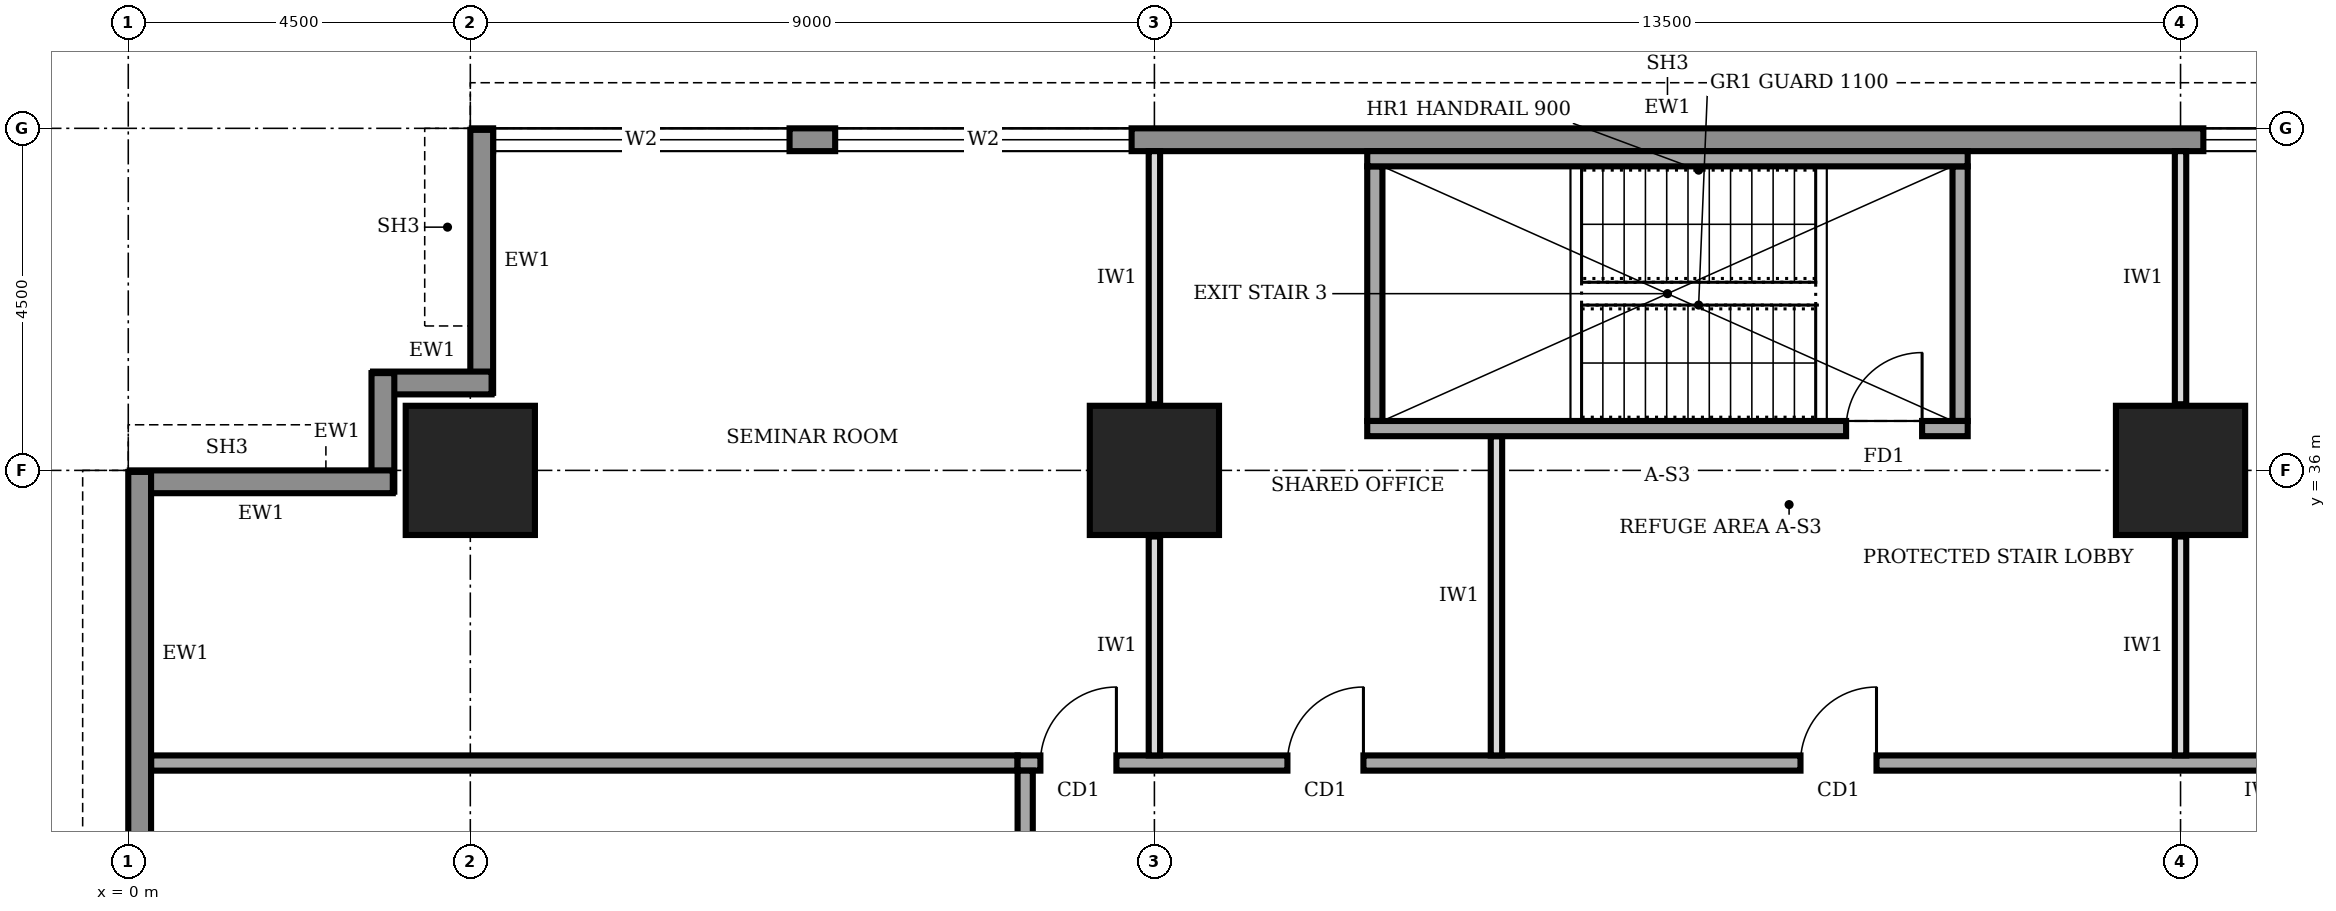
"""IFC4 building model, lengths in metres.
Left out: names, types, materials, properties, quantities, classifications, styles, units other than length and angle.
Written with IfcOpenShell. Run it as: python <this file> out.ifc"""

import sys

from ifc_helpers import new_model, si_unit, direction, frame, frame_2d, origin, origin_2d, place, context, subcontext, project, spatial, rectangle, extrude, element, fill, save


model = new_model("IFC4")
c1 = context("Model", 3, precision=1e-05, world=origin(), true_north=direction((0.0, 1.0)))
c2 = subcontext(c1, "Body", "Model", "MODEL_VIEW")
j1 = project(units=[si_unit("LENGTHUNIT", "METRE"), si_unit("PLANEANGLEUNIT", "RADIAN")], contexts=[c1])
p1 = place(None, origin())
s1 = spatial("IfcSite", under=j1, at=p1, CompositionType="ELEMENT")
p2 = place(p1, origin())
s2 = spatial("IfcBuilding", under=s1, at=p2, CompositionType="ELEMENT")
p3 = place(p2, frame((0.0, 0.0, 165.0)))
s3 = spatial("IfcBuildingStorey", under=s2, at=p3, CompositionType="ELEMENT", Elevation=165.0)
for number, where, z_axis, x_axis in (
    (1, (4.5, 36.0, 0.0), (0.0, 0.0, 1.0), (1.0, 0.0, 0.0)),
    (2, (13.5, 36.0, 0.0), (0.0, 0.0, 1.0), (1.0, 0.0, 0.0)),
    (3, (27.0, 36.0, 0.0), (0.0, 0.0, 1.0), (1.0, 0.0, 0.0)),
):
    element("IfcColumn", number, at=place(p3, frame(where, z_axis=z_axis, x_axis=x_axis)), inside=s3, PredefinedType="COLUMN", context=c2, shape_type="SweptSolid", body=[
        extrude(rectangle(XDim=1.7, YDim=1.7, at=origin_2d()), origin(), (0.0, 0.0, 1.0), 4.0),
    ])
p4 = place(p3, frame((35.98, 40.35, 0.0), z_axis=(0.0, 0.0, 1.0), x_axis=(-1.0, 0.0, 0.0)))
e4 = element("IfcWall", 4, at=p4, inside=s3, PredefinedType="STANDARD", context=c2, shape_type="SweptSolid", body=[
    extrude(rectangle(XDim=31.46, YDim=0.3, at=frame_2d((15.73, 0.0))), origin(), (0.0, 0.0, 1.0), 3.75),
])
p5 = place(p4, frame((27.28, 0.0, 0.6)))
e5 = element("IfcOpeningElement", 5, at=p5, cuts=e4, PredefinedType="OPENING", context=c2, shape_type="SweptSolid", body=[
    extrude(rectangle(XDim=3.9, YDim=2.6, at=frame_2d((1.95, 1.3))), frame((0.0, 0.16, 0.0), z_axis=(0.0, -1.0, 0.0), x_axis=(1.0, 0.0, 0.0)), (0.0, 0.0, 1.0), 0.32),
])
p6 = place(p4, frame((22.78, 0.0, 0.6)))
e6 = element("IfcOpeningElement", 6, at=p6, cuts=e4, PredefinedType="OPENING", context=c2, shape_type="SweptSolid", body=[
    extrude(rectangle(XDim=3.9, YDim=2.6, at=frame_2d((1.95, 1.3))), frame((0.0, 0.16, 0.0), z_axis=(0.0, -1.0, 0.0), x_axis=(1.0, 0.0, 0.0)), (0.0, 0.0, 1.0), 0.32),
])
p7 = place(p4, frame((4.78, 0.0, 0.6)))
e7 = element("IfcOpeningElement", 7, at=p7, cuts=e4, PredefinedType="OPENING", context=c2, shape_type="SweptSolid", body=[
    extrude(rectangle(XDim=3.9, YDim=2.6, at=frame_2d((1.95, 1.3))), frame((0.0, 0.16, 0.0), z_axis=(0.0, -1.0, 0.0), x_axis=(1.0, 0.0, 0.0)), (0.0, 0.0, 1.0), 0.32),
])
p8 = place(p3, frame((4.65, 40.48, 0.0), z_axis=(0.0, 0.0, 1.0), x_axis=(0.0, -1.0, 0.0)))
e8 = element("IfcWall", 8, at=p8, inside=s3, PredefinedType="STANDARD", context=c2, shape_type="SweptSolid", body=[
    extrude(rectangle(XDim=3.46, YDim=0.3, at=frame_2d((1.73, 0.0))), origin(), (0.0, 0.0, 1.0), 2.75),
])
for number, where, z_axis, x_axis in (
    (9, (4.78, 37.15, 0.0), (0.0, 0.0, 1.0), (-1.0, 0.0, 0.0)),
    (10, (3.35, 37.28, 0.0), (0.0, 0.0, 1.0), (0.0, -1.0, 0.0)),
):
    element("IfcWall", number, at=place(p3, frame(where, z_axis=z_axis, x_axis=x_axis)), inside=s3, PredefinedType="STANDARD", context=c2, shape_type="SweptSolid", body=[
        extrude(rectangle(XDim=1.56, YDim=0.3, at=frame_2d((0.78, 0.0))), origin(), (0.0, 0.0, 1.0), 3.75),
    ])
p9 = place(p3, frame((3.48, 35.85, 0.0), z_axis=(0.0, 0.0, 1.0), x_axis=(-1.0, 0.0, 0.0)))
e11 = element("IfcWall", 11, at=p9, inside=s3, PredefinedType="STANDARD", context=c2, shape_type="SweptSolid", body=[
    extrude(rectangle(XDim=3.46, YDim=0.3, at=frame_2d((1.73, 0.0))), origin(), (0.0, 0.0, 1.0), 2.75),
])
p10 = place(p3, frame((0.15, 35.98, 0.0), z_axis=(0.0, 0.0, 1.0), x_axis=(0.0, -1.0, 0.0)))
e12 = element("IfcWall", 12, at=p10, inside=s3, PredefinedType="STANDARD", context=c2, shape_type="SweptSolid", body=[
    extrude(rectangle(XDim=31.46, YDim=0.3, at=frame_2d((15.73, 0.0))), origin(), (0.0, 0.0, 1.0), 3.75),
])
p11 = place(p10, frame((27.28, 0.0, 0.6)))
e13 = element("IfcOpeningElement", 13, at=p11, cuts=e12, PredefinedType="OPENING", context=c2, shape_type="SweptSolid", body=[
    extrude(rectangle(XDim=3.9, YDim=2.6, at=frame_2d((1.95, 1.3))), frame((0.0, 0.16, 0.0), z_axis=(0.0, -1.0, 0.0), x_axis=(1.0, 0.0, 0.0)), (0.0, 0.0, 1.0), 0.32),
])
p12 = place(p10, frame((22.78, 0.0, 0.6)))
e14 = element("IfcOpeningElement", 14, at=p12, cuts=e12, PredefinedType="OPENING", context=c2, shape_type="SweptSolid", body=[
    extrude(rectangle(XDim=3.9, YDim=2.6, at=frame_2d((1.95, 1.3))), frame((0.0, 0.16, 0.0), z_axis=(0.0, -1.0, 0.0), x_axis=(1.0, 0.0, 0.0)), (0.0, 0.0, 1.0), 0.32),
])
p13 = place(p10, frame((18.28, 0.0, 0.6)))
e15 = element("IfcOpeningElement", 15, at=p13, cuts=e12, PredefinedType="OPENING", context=c2, shape_type="SweptSolid", body=[
    extrude(rectangle(XDim=3.9, YDim=2.6, at=frame_2d((1.95, 1.3))), frame((0.0, 0.16, 0.0), z_axis=(0.0, -1.0, 0.0), x_axis=(1.0, 0.0, 0.0)), (0.0, 0.0, 1.0), 0.32),
])
p14 = place(p10, frame((13.78, 0.0, 0.6)))
e16 = element("IfcOpeningElement", 16, at=p14, cuts=e12, PredefinedType="OPENING", context=c2, shape_type="SweptSolid", body=[
    extrude(rectangle(XDim=3.9, YDim=2.6, at=frame_2d((1.95, 1.3))), frame((0.0, 0.16, 0.0), z_axis=(0.0, -1.0, 0.0), x_axis=(1.0, 0.0, 0.0)), (0.0, 0.0, 1.0), 0.32),
])
p15 = place(p10, frame((9.28, 0.0, 0.6)))
e17 = element("IfcOpeningElement", 17, at=p15, cuts=e12, PredefinedType="OPENING", context=c2, shape_type="SweptSolid", body=[
    extrude(rectangle(XDim=3.9, YDim=2.6, at=frame_2d((1.95, 1.3))), frame((0.0, 0.16, 0.0), z_axis=(0.0, -1.0, 0.0), x_axis=(1.0, 0.0, 0.0)), (0.0, 0.0, 1.0), 0.32),
])
p16 = place(p10, frame((4.78, 0.0, 0.6)))
e18 = element("IfcOpeningElement", 18, at=p16, cuts=e12, PredefinedType="OPENING", context=c2, shape_type="SweptSolid", body=[
    extrude(rectangle(XDim=3.9, YDim=2.6, at=frame_2d((1.95, 1.3))), frame((0.0, 0.16, 0.0), z_axis=(0.0, -1.0, 0.0), x_axis=(1.0, 0.0, 0.0)), (0.0, 0.0, 1.0), 0.32),
])
p17 = place(p3, frame((40.2, 32.15, 0.0), z_axis=(0.0, 0.0, 1.0), x_axis=(-1.0, 0.0, 0.0)))
e19 = element("IfcWall", 19, at=p17, inside=s3, PredefinedType="SOLIDWALL", context=c2, shape_type="SweptSolid", body=[
    extrude(rectangle(XDim=28.5, YDim=0.2, at=frame_2d((14.25, 0.0))), origin(), (0.0, 0.0, 1.0), 3.75),
])
p18 = place(p17, frame((27.2, 0.0, 0.0)))
e20 = element("IfcOpeningElement", 20, at=p18, cuts=e19, PredefinedType="OPENING", context=c2, shape_type="SweptSolid", body=[
    extrude(rectangle(XDim=1.0, YDim=2.1, at=frame_2d((0.5, 1.05))), frame((0.0, 0.11, 0.0), z_axis=(0.0, -1.0, 0.0), x_axis=(1.0, 0.0, 0.0)), (0.0, 0.0, 1.0), 0.22),
])
p19 = place(p17, frame((23.95, 0.0, 0.0)))
e21 = element("IfcOpeningElement", 21, at=p19, cuts=e19, PredefinedType="OPENING", context=c2, shape_type="SweptSolid", body=[
    extrude(rectangle(XDim=1.0, YDim=2.1, at=frame_2d((0.5, 1.05))), frame((0.0, 0.11, 0.0), z_axis=(0.0, -1.0, 0.0), x_axis=(1.0, 0.0, 0.0)), (0.0, 0.0, 1.0), 0.22),
])
p20 = place(p17, frame((17.2, 0.0, 0.0)))
e22 = element("IfcOpeningElement", 22, at=p20, cuts=e19, PredefinedType="OPENING", context=c2, shape_type="SweptSolid", body=[
    extrude(rectangle(XDim=1.0, YDim=2.1, at=frame_2d((0.5, 1.05))), frame((0.0, 0.11, 0.0), z_axis=(0.0, -1.0, 0.0), x_axis=(1.0, 0.0, 0.0)), (0.0, 0.0, 1.0), 0.22),
])
p21 = place(p17, frame((6.0, 0.0, 0.0)))
e23 = element("IfcOpeningElement", 23, at=p21, cuts=e19, PredefinedType="OPENING", context=c2, shape_type="SweptSolid", body=[
    extrude(rectangle(XDim=1.0, YDim=2.1, at=frame_2d((0.5, 1.05))), frame((0.0, 0.11, 0.0), z_axis=(0.0, -1.0, 0.0), x_axis=(1.0, 0.0, 0.0)), (0.0, 0.0, 1.0), 0.22),
])
p22 = place(p3, frame((11.8, 32.05, 0.0), z_axis=(0.0, 0.0, 1.0), x_axis=(0.0, -1.0, 0.0)))
e24 = element("IfcWall", 24, at=p22, inside=s3, PredefinedType="SOLIDWALL", context=c2, shape_type="SweptSolid", body=[
    extrude(rectangle(XDim=23.8, YDim=0.2, at=frame_2d((11.9, 0.0))), origin(), (0.0, 0.0, 1.0), 3.75),
])
p23 = place(p22, frame((20.675, 0.0, 0.0)))
e25 = element("IfcOpeningElement", 25, at=p23, cuts=e24, PredefinedType="OPENING", context=c2, shape_type="SweptSolid", body=[
    extrude(rectangle(XDim=1.0, YDim=2.1, at=frame_2d((0.5, 1.05))), frame((0.0, 0.11, 0.0), z_axis=(0.0, -1.0, 0.0), x_axis=(1.0, 0.0, 0.0)), (0.0, 0.0, 1.0), 0.22),
])
p24 = place(p22, frame((16.2, 0.0, 0.0)))
e26 = element("IfcOpeningElement", 26, at=p24, cuts=e24, PredefinedType="OPENING", context=c2, shape_type="SweptSolid", body=[
    extrude(rectangle(XDim=0.9, YDim=2.1, at=frame_2d((0.45, 1.05))), frame((0.0, 0.11, 0.0), z_axis=(0.0, -1.0, 0.0), x_axis=(1.0, 0.0, 0.0)), (0.0, 0.0, 1.0), 0.22),
])
p25 = place(p22, frame((13.2, 0.0, 0.0)))
e27 = element("IfcOpeningElement", 27, at=p25, cuts=e24, PredefinedType="OPENING", context=c2, shape_type="SweptSolid", body=[
    extrude(rectangle(XDim=0.9, YDim=2.1, at=frame_2d((0.45, 1.05))), frame((0.0, 0.11, 0.0), z_axis=(0.0, -1.0, 0.0), x_axis=(1.0, 0.0, 0.0)), (0.0, 0.0, 1.0), 0.22),
])
p26 = place(p22, frame((8.35, 0.0, 0.0)))
e28 = element("IfcOpeningElement", 28, at=p26, cuts=e24, PredefinedType="OPENING", context=c2, shape_type="SweptSolid", body=[
    extrude(rectangle(XDim=0.9, YDim=2.1, at=frame_2d((0.45, 1.05))), frame((0.0, 0.11, 0.0), z_axis=(0.0, -1.0, 0.0), x_axis=(1.0, 0.0, 0.0)), (0.0, 0.0, 1.0), 0.22),
])
p27 = place(p22, frame((5.55, 0.0, 0.0)))
e29 = element("IfcOpeningElement", 29, at=p27, cuts=e24, PredefinedType="OPENING", context=c2, shape_type="SweptSolid", body=[
    extrude(rectangle(XDim=1.0, YDim=2.1, at=frame_2d((0.5, 1.05))), frame((0.0, 0.11, 0.0), z_axis=(0.0, -1.0, 0.0), x_axis=(1.0, 0.0, 0.0)), (0.0, 0.0, 1.0), 0.22),
])
p28 = place(p22, frame((11.05, 0.0, 0.0)))
e30 = element("IfcOpeningElement", 30, at=p28, cuts=e24, PredefinedType="OPENING", context=c2, shape_type="SweptSolid", body=[
    extrude(rectangle(XDim=1.0, YDim=2.1, at=frame_2d((0.5, 1.05))), frame((0.0, 0.11, 0.0), z_axis=(0.0, -1.0, 0.0), x_axis=(1.0, 0.0, 0.0)), (0.0, 0.0, 1.0), 0.22),
])
p29 = place(p22, frame((1.925, 0.0, 0.0)))
e31 = element("IfcOpeningElement", 31, at=p29, cuts=e24, PredefinedType="OPENING", context=c2, shape_type="SweptSolid", body=[
    extrude(rectangle(XDim=1.0, YDim=2.1, at=frame_2d((0.5, 1.05))), frame((0.0, 0.11, 0.0), z_axis=(0.0, -1.0, 0.0), x_axis=(1.0, 0.0, 0.0)), (0.0, 0.0, 1.0), 0.22),
])
p30 = place(p3, frame((0.3, 32.15, 0.0), z_axis=(0.0, 0.0, 1.0), x_axis=(1.0, 0.0, 0.0)))
e32 = element("IfcWall", 32, at=p30, inside=s3, PredefinedType="SOLIDWALL", context=c2, shape_type="SweptSolid", body=[
    extrude(rectangle(XDim=11.4, YDim=0.2, at=frame_2d((5.7, 0.0))), origin(), (0.0, 0.0, 1.0), 3.75),
])
p31 = place(p3, frame((13.5, 32.25, 0.0), z_axis=(0.0, 0.0, 1.0), x_axis=(0.0, 1.0, 0.0)))
e33 = element("IfcWall", 33, at=p31, inside=s3, PredefinedType="PARTITIONING", context=c2, shape_type="SweptSolid", body=[
    extrude(rectangle(XDim=2.88, YDim=0.15, at=frame_2d((1.44, 0.0))), origin(), (0.0, 0.0, 1.0), 3.75),
])
p32 = place(p3, frame((13.5, 36.87, 0.0), z_axis=(0.0, 0.0, 1.0), x_axis=(0.0, 1.0, 0.0)))
e34 = element("IfcWall", 34, at=p32, inside=s3, PredefinedType="PARTITIONING", context=c2, shape_type="SweptSolid", body=[
    extrude(rectangle(XDim=3.33, YDim=0.15, at=frame_2d((1.665, 0.0))), origin(), (0.0, 0.0, 1.0), 2.75),
])
p33 = place(p3, frame((18.0, 32.25, 0.0), z_axis=(0.0, 0.0, 1.0), x_axis=(0.0, 1.0, 0.0)))
e35 = element("IfcWall", 35, at=p33, inside=s3, PredefinedType="PARTITIONING", context=c2, shape_type="SweptSolid", body=[
    extrude(rectangle(XDim=4.2, YDim=0.15, at=frame_2d((2.1, 0.0))), origin(), (0.0, 0.0, 1.0), 3.75),
])
p34 = place(p3, frame((27.0, 32.25, 0.0), z_axis=(0.0, 0.0, 1.0), x_axis=(0.0, 1.0, 0.0)))
e36 = element("IfcWall", 36, at=p34, inside=s3, PredefinedType="PARTITIONING", context=c2, shape_type="SweptSolid", body=[
    extrude(rectangle(XDim=2.88, YDim=0.15, at=frame_2d((1.44, 0.0))), origin(), (0.0, 0.0, 1.0), 3.75),
])
p35 = place(p3, frame((27.0, 36.87, 0.0), z_axis=(0.0, 0.0, 1.0), x_axis=(0.0, 1.0, 0.0)))
e37 = element("IfcWall", 37, at=p35, inside=s3, PredefinedType="PARTITIONING", context=c2, shape_type="SweptSolid", body=[
    extrude(rectangle(XDim=3.33, YDim=0.15, at=frame_2d((1.665, 0.0))), origin(), (0.0, 0.0, 1.0), 2.75),
])
p36 = place(p3, frame((16.3, 36.55, 0.0), z_axis=(0.0, 0.0, 1.0), x_axis=(1.0, 0.0, 0.0)))
e38 = element("IfcWall", 38, at=p36, inside=s3, PredefinedType="SOLIDWALL", context=c2, shape_type="SweptSolid", body=[
    extrude(rectangle(XDim=7.9, YDim=0.2, at=frame_2d((3.95, 0.0))), origin(), (0.0, 0.0, 1.0), 3.75),
])
p37 = place(p36, frame((6.3, 0.0, 0.0)))
e39 = element("IfcOpeningElement", 39, at=p37, cuts=e38, PredefinedType="OPENING", context=c2, shape_type="SweptSolid", body=[
    extrude(rectangle(XDim=1.0, YDim=2.1, at=frame_2d((0.5, 1.05))), frame((0.0, 0.11, 0.0), z_axis=(0.0, -1.0, 0.0), x_axis=(1.0, 0.0, 0.0)), (0.0, 0.0, 1.0), 0.22),
])
p38 = place(p3, frame((16.3, 40.1, 0.0), z_axis=(0.0, 0.0, 1.0), x_axis=(1.0, 0.0, 0.0)))
e40 = element("IfcWall", 40, at=p38, inside=s3, PredefinedType="SOLIDWALL", context=c2, shape_type="SweptSolid", body=[
    extrude(rectangle(XDim=7.9, YDim=0.2, at=frame_2d((3.95, 0.0))), origin(), (0.0, 0.0, 1.0), 3.75),
])
for number, where, z_axis, x_axis in (
    (41, (16.4, 36.65, 0.0), (0.0, 0.0, 1.0), (0.0, 1.0, 0.0)),
    (42, (24.1, 36.65, 0.0), (0.0, 0.0, 1.0), (0.0, 1.0, 0.0)),
):
    element("IfcWall", number, at=place(p3, frame(where, z_axis=z_axis, x_axis=x_axis)), inside=s3, PredefinedType="SOLIDWALL", context=c2, shape_type="SweptSolid", body=[
        extrude(rectangle(XDim=3.35, YDim=0.2, at=frame_2d((1.675, 0.0))), origin(), (0.0, 0.0, 1.0), 3.75),
    ])
p39 = place(p5, origin())
e43 = element("IfcWindow", 43, at=p39, inside=s3, PartitioningType="SINGLE_PANEL", PredefinedType="WINDOW", context=c2, shape_type="SweptSolid", body=[
    extrude(rectangle(XDim=3.9, YDim=2.6, at=frame_2d((1.95, 1.3))), frame((0.0, 0.03, 0.0), z_axis=(0.0, -1.0, 0.0), x_axis=(1.0, 0.0, 0.0)), (0.0, 0.0, 1.0), 0.06),
])
fill(e5, e43)
p40 = place(p6, origin())
e44 = element("IfcWindow", 44, at=p40, inside=s3, PartitioningType="SINGLE_PANEL", PredefinedType="WINDOW", context=c2, shape_type="SweptSolid", body=[
    extrude(rectangle(XDim=3.9, YDim=2.6, at=frame_2d((1.95, 1.3))), frame((0.0, 0.03, 0.0), z_axis=(0.0, -1.0, 0.0), x_axis=(1.0, 0.0, 0.0)), (0.0, 0.0, 1.0), 0.06),
])
fill(e6, e44)
p41 = place(p7, origin())
e45 = element("IfcWindow", 45, at=p41, inside=s3, PartitioningType="SINGLE_PANEL", PredefinedType="WINDOW", context=c2, shape_type="SweptSolid", body=[
    extrude(rectangle(XDim=3.9, YDim=2.6, at=frame_2d((1.95, 1.3))), frame((0.0, 0.03, 0.0), z_axis=(0.0, -1.0, 0.0), x_axis=(1.0, 0.0, 0.0)), (0.0, 0.0, 1.0), 0.06),
])
fill(e7, e45)
p42 = place(p18, frame((1.0, 0.0, 0.0), z_axis=(0.0, 0.0, 1.0), x_axis=(-1.0, 0.0, 0.0)))
e46 = element("IfcDoor", 46, at=p42, inside=s3, OperationType="SINGLE_SWING_RIGHT", PredefinedType="DOOR", context=c2, shape_type="SweptSolid", body=[
    extrude(rectangle(XDim=1.0, YDim=2.1, at=frame_2d((0.5, 1.05))), frame((0.0, 0.025, 0.0), z_axis=(0.0, -1.0, 0.0), x_axis=(1.0, 0.0, 0.0)), (0.0, 0.0, 1.0), 0.05),
])
fill(e20, e46)
p43 = place(p19, frame((1.0, 0.0, 0.0), z_axis=(0.0, 0.0, 1.0), x_axis=(-1.0, 0.0, 0.0)))
e47 = element("IfcDoor", 47, at=p43, inside=s3, OperationType="SINGLE_SWING_RIGHT", PredefinedType="DOOR", context=c2, shape_type="SweptSolid", body=[
    extrude(rectangle(XDim=1.0, YDim=2.1, at=frame_2d((0.5, 1.05))), frame((0.0, 0.025, 0.0), z_axis=(0.0, -1.0, 0.0), x_axis=(1.0, 0.0, 0.0)), (0.0, 0.0, 1.0), 0.05),
])
fill(e21, e47)
p44 = place(p20, frame((1.0, 0.0, 0.0), z_axis=(0.0, 0.0, 1.0), x_axis=(-1.0, 0.0, 0.0)))
e48 = element("IfcDoor", 48, at=p44, inside=s3, OperationType="SINGLE_SWING_RIGHT", PredefinedType="DOOR", context=c2, shape_type="SweptSolid", body=[
    extrude(rectangle(XDim=1.0, YDim=2.1, at=frame_2d((0.5, 1.05))), frame((0.0, 0.025, 0.0), z_axis=(0.0, -1.0, 0.0), x_axis=(1.0, 0.0, 0.0)), (0.0, 0.0, 1.0), 0.05),
])
fill(e22, e48)
p45 = place(p37, origin())
e49 = element("IfcDoor", 49, at=p45, inside=s3, OperationType="SINGLE_SWING_RIGHT", PredefinedType="DOOR", context=c2, shape_type="SweptSolid", body=[
    extrude(rectangle(XDim=1.0, YDim=2.1, at=frame_2d((0.5, 1.05))), frame((0.0, 0.025, 0.0), z_axis=(0.0, -1.0, 0.0), x_axis=(1.0, 0.0, 0.0)), (0.0, 0.0, 1.0), 0.05),
])
fill(e39, e49)
save(model, sys.argv[1])
